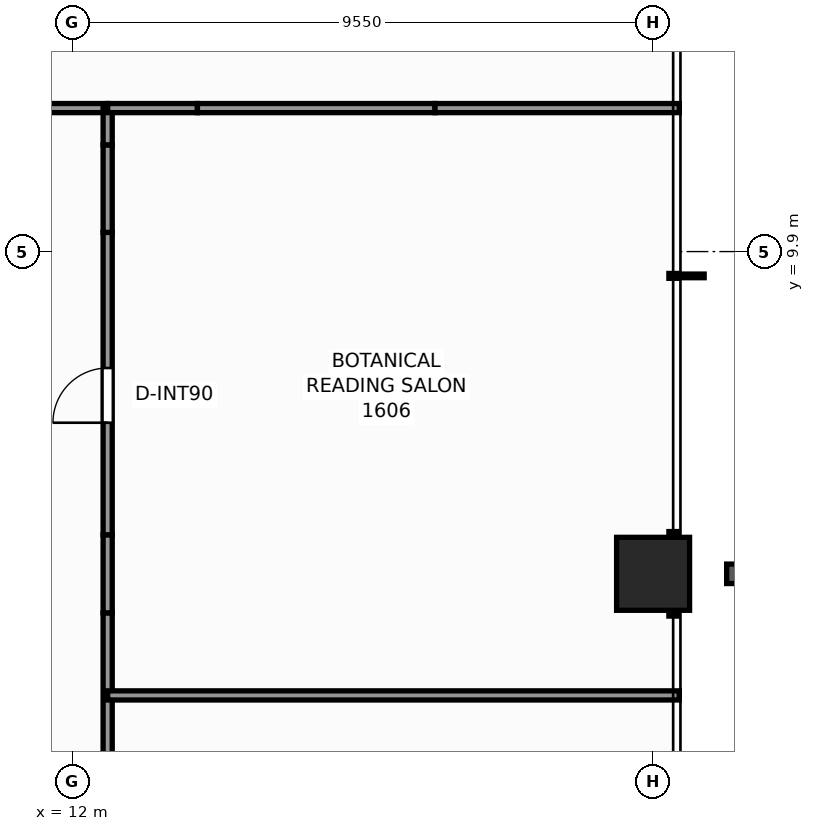
"""IFC4 building model, lengths in metres.
Left out: names, types, materials, properties, quantities, classifications, styles, units other than length and angle.
Written with IfcOpenShell. Run it as: python <this file> out.ifc"""

import sys

from ifc_helpers import new_model, si_unit, direction, frame, frame_2d, origin, origin_2d, place, context, subcontext, project, spatial, rectangle, extrude, element, fill, save


model = new_model("IFC4")
c1 = context("Model", 3, precision=1e-05, world=origin(), true_north=direction((0.0, 1.0)))
c2 = subcontext(c1, "Body", "Model", "MODEL_VIEW")
j1 = project(units=[si_unit("LENGTHUNIT", "METRE"), si_unit("PLANEANGLEUNIT", "RADIAN")], contexts=[c1])
p1 = place(None, origin())
s1 = spatial("IfcSite", under=j1, at=p1, CompositionType="ELEMENT")
p2 = place(p1, origin())
s2 = spatial("IfcBuilding", under=s1, at=p2, CompositionType="ELEMENT")
p3 = place(p2, frame((0.0, 0.0, 56.8)))
s3 = spatial("IfcBuildingStorey", under=s2, at=p3, CompositionType="ELEMENT", Elevation=56.8)
p4 = place(p3, frame((21.55, 4.6, 0.0), z_axis=(0.0, 0.0, 1.0), x_axis=(1.0, 0.0, 0.0)))
e1 = element("IfcColumn", 1, at=p4, inside=s3, PredefinedType="COLUMN", context=c2, shape_type="SweptSolid", body=[
    extrude(rectangle(XDim=1.2, YDim=1.2, at=origin_2d()), origin(), (0.0, 0.0, 1.0), 3.3),
])
p5 = place(p3, frame((11.531, 12.26, 0.0), z_axis=(0.0, 0.0, 1.0), x_axis=(1.0, 0.0, 0.0)))
e2 = element("IfcWall", 2, at=p5, inside=s3, PredefinedType="PARTITIONING", context=c2, shape_type="SweptSolid", body=[
    extrude(rectangle(XDim=1.049, YDim=0.15, at=frame_2d((0.524, 0.0))), origin(), (0.0, 0.0, 1.0), 3.06),
])
p6 = place(p3, frame((12.58, -3.958, 0.0), z_axis=(0.0, 0.0, 1.0), x_axis=(0.0, 1.0, 0.0)))
e3 = element("IfcWall", 3, at=p6, inside=s3, PredefinedType="PARTITIONING", context=c2, shape_type="SweptSolid", body=[
    extrude(rectangle(XDim=7.916, YDim=0.15, at=frame_2d((3.958, 0.0))), origin(), (0.0, 0.0, 1.0), 2.349),
])
p7 = place(p6, frame((1.478, 0.0, 0.0)))
e4 = element("IfcOpeningElement", 4, at=p7, cuts=e3, PredefinedType="OPENING", context=c2, shape_type="SweptSolid", body=[
    extrude(rectangle(XDim=0.9, YDim=2.06, at=frame_2d((0.45, 1.03))), frame((0.0, 0.085, 0.0), z_axis=(0.0, -1.0, 0.0), x_axis=(1.0, 0.0, 0.0)), (0.0, 0.0, 1.0), 0.17),
])
p8 = place(p3, frame((12.58, 3.958, 0.0), z_axis=(0.0, 0.0, 1.0), x_axis=(0.0, 1.0, 0.0)))
e5 = element("IfcWall", 5, at=p8, inside=s3, PredefinedType="PARTITIONING", context=c2, shape_type="SweptSolid", body=[
    extrude(rectangle(XDim=1.284, YDim=0.15, at=frame_2d((0.642, 0.0))), origin(), (0.0, 0.0, 1.0), 1.245),
])
p9 = place(p3, frame((12.58, 5.242, 0.0), z_axis=(0.0, 0.0, 1.0), x_axis=(0.0, 1.0, 0.0)))
e6 = element("IfcWall", 6, at=p9, inside=s3, PredefinedType="PARTITIONING", context=c2, shape_type="SweptSolid", body=[
    extrude(rectangle(XDim=4.974, YDim=0.15, at=frame_2d((2.487, 0.0))), origin(), (0.0, 0.0, 1.0), 3.06),
])
p10 = place(p9, frame((1.843, 0.0, 0.0)))
e7 = element("IfcOpeningElement", 7, at=p10, cuts=e6, PredefinedType="OPENING", context=c2, shape_type="SweptSolid", body=[
    extrude(rectangle(XDim=0.9, YDim=2.06, at=frame_2d((0.45, 1.03))), frame((0.0, 0.085, 0.0), z_axis=(0.0, -1.0, 0.0), x_axis=(1.0, 0.0, 0.0)), (0.0, 0.0, 1.0), 0.17),
])
p11 = place(p3, frame((12.58, 10.216, 0.0), z_axis=(0.0, 0.0, 1.0), x_axis=(0.0, 1.0, 0.0)))
e8 = element("IfcWall", 8, at=p11, inside=s3, PredefinedType="PARTITIONING", context=c2, shape_type="SweptSolid", body=[
    extrude(rectangle(XDim=1.439, YDim=0.15, at=frame_2d((0.72, 0.0))), origin(), (0.0, 0.0, 1.0), 1.245),
])
p12 = place(p3, frame((12.58, 11.655, 0.0), z_axis=(0.0, 0.0, 1.0), x_axis=(0.0, 1.0, 0.0)))
e9 = element("IfcWall", 9, at=p12, inside=s3, PredefinedType="PARTITIONING", context=c2, shape_type="SweptSolid", body=[
    extrude(rectangle(XDim=0.605, YDim=0.15, at=frame_2d((0.303, 0.0))), origin(), (0.0, 0.0, 1.0), 3.06),
])
p13 = place(p3, frame((12.58, 12.26, 0.0), z_axis=(0.0, 0.0, 1.0), x_axis=(1.0, 0.0, 0.0)))
e10 = element("IfcWall", 10, at=p13, inside=s3, PredefinedType="PARTITIONING", context=c2, shape_type="SweptSolid", body=[
    extrude(rectangle(XDim=1.476, YDim=0.15, at=frame_2d((0.738, 0.0))), origin(), (0.0, 0.0, 1.0), 3.06),
])
p14 = place(p3, frame((14.056, 12.26, 0.0), z_axis=(0.0, 0.0, 1.0), x_axis=(1.0, 0.0, 0.0)))
e11 = element("IfcWall", 11, at=p14, inside=s3, PredefinedType="PARTITIONING", context=c2, shape_type="SweptSolid", body=[
    extrude(rectangle(XDim=3.907, YDim=0.15, at=frame_2d((1.954, 0.0))), origin(), (0.0, 0.0, 1.0), 1.245),
])
p15 = place(p3, frame((17.963, 12.26, 0.0), z_axis=(0.0, 0.0, 1.0), x_axis=(1.0, 0.0, 0.0)))
e12 = element("IfcWall", 12, at=p15, inside=s3, PredefinedType="PARTITIONING", context=c2, shape_type="SweptSolid", body=[
    extrude(rectangle(XDim=4.017, YDim=0.15, at=frame_2d((2.008, 0.0))), origin(), (0.0, 0.0, 1.0), 2.429),
])
p16 = place(p3, frame((12.58, 2.6, 0.0), z_axis=(0.0, 0.0, 1.0), x_axis=(1.0, 0.0, 0.0)))
e13 = element("IfcWall", 13, at=p16, inside=s3, PredefinedType="PARTITIONING", context=c2, shape_type="SweptSolid", body=[
    extrude(rectangle(XDim=9.4, YDim=0.15, at=frame_2d((4.7, 0.0))), origin(), (0.0, 0.0, 1.0), 2.429),
])
p17 = place(p10, origin())
e14 = element("IfcDoor", 14, at=p17, inside=s3, OperationType="SINGLE_SWING_LEFT", PredefinedType="DOOR", context=c2, shape_type="SweptSolid", body=[
    extrude(rectangle(XDim=0.9, YDim=2.06, at=frame_2d((0.45, 1.03))), frame((0.0, 0.025, 0.0), z_axis=(0.0, -1.0, 0.0), x_axis=(1.0, 0.0, 0.0)), (0.0, 0.0, 1.0), 0.05),
])
fill(e7, e14)
save(model, sys.argv[1])
